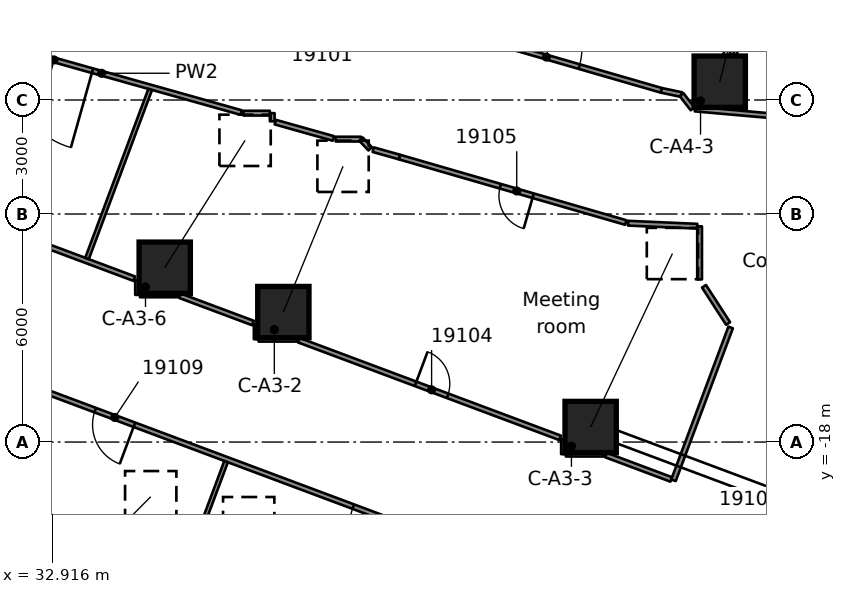
"""IFC4 building model, lengths in metres.
Left out: names, types, materials, properties, quantities, classifications, styles, units other than length and angle.
Written with IfcOpenShell. Run it as: python <this file> out.ifc"""

import sys

from ifc_helpers import new_model, si_unit, direction, frame, frame_2d, origin, origin_2d, place, context, subcontext, project, spatial, rectangle, extrude, element, fill, save


model = new_model("IFC4")
c1 = context("Model", 3, precision=1e-05, world=origin(), true_north=direction((0.0, 1.0)))
c2 = subcontext(c1, "Body", "Model", "MODEL_VIEW")
j1 = project(units=[si_unit("LENGTHUNIT", "METRE"), si_unit("PLANEANGLEUNIT", "RADIAN")], contexts=[c1])
p1 = place(None, origin())
s1 = spatial("IfcSite", under=j1, at=p1, CompositionType="ELEMENT")
p2 = place(p1, origin())
s2 = spatial("IfcBuilding", under=s1, at=p2, CompositionType="ELEMENT")
p3 = place(p2, frame((0.0, 0.0, 98.2)))
s3 = spatial("IfcBuildingStorey", under=s2, at=p3, CompositionType="ELEMENT", Elevation=98.2)
p4 = place(p3, frame((35.6, -23.666, 0.562), z_axis=(0.478128500861, 0.682101182208, 0.553291165568), x_axis=(-0.818860826557, 0.573992113822, 0.0)))
e1 = element("IfcColumn", 1, at=p4, inside=s3, PredefinedType="COLUMN", context=c2, shape_type="SweptSolid", body=[
    extrude(rectangle(XDim=1.35, YDim=1.35, at=origin_2d()), origin(), (0.0, 0.0, 1.0), 5.197),
])
p5 = place(p3, frame((32.478, -22.499, 0.561), z_axis=(0.584827103489, 0.59100203301, 0.555602246218), x_axis=(-0.710810388634, 0.703383672977, 0.0)))
e2 = element("IfcColumn", 2, at=p5, inside=s3, PredefinedType="COLUMN", context=c2, shape_type="SweptSolid", body=[
    extrude(rectangle(XDim=1.35, YDim=1.35, at=origin_2d()), origin(), (0.0, 0.0, 1.0), 5.179),
])
p6 = place(p3, frame((38.997, -14.58, 0.553), z_axis=(0.310782507683, 0.758869548286, 0.572303452377), x_axis=(-0.925403354822, 0.378983681555, 0.0)))
e3 = element("IfcColumn", 3, at=p6, inside=s3, PredefinedType="COLUMN", context=c2, shape_type="SweptSolid", body=[
    extrude(rectangle(XDim=1.35, YDim=1.35, at=origin_2d()), origin(), (0.0, 0.0, 1.0), 5.055),
])
p7 = place(p3, frame((47.083, -17.604, 0.589), z_axis=(0.372353666966, 0.789462395389, 0.487956835143), x_axis=(-0.904446734387, 0.42658657346, 0.0)))
e4 = element("IfcColumn", 4, at=p7, inside=s3, PredefinedType="COLUMN", context=c2, shape_type="SweptSolid", body=[
    extrude(rectangle(XDim=1.35, YDim=1.35, at=origin_2d()), origin(), (0.0, 0.0, 1.0), 5.782),
])
p8 = place(p3, frame((35.875, -13.413, 0.544), z_axis=(0.430023456329, 0.681544736858, 0.592095092589), x_axis=(-0.845727400457, 0.533615183551, 0.0)))
e5 = element("IfcColumn", 5, at=p8, inside=s3, PredefinedType="COLUMN", context=c2, shape_type="SweptSolid", body=[
    extrude(rectangle(XDim=1.35, YDim=1.35, at=origin_2d()), origin(), (0.0, 0.0, 1.0), 4.918),
])
p9 = place(p3, frame((50.48, -8.518, 0.588), z_axis=(0.215420955051, 0.844110563968, 0.4909899876), x_axis=(-0.968944293567, 0.247279105393, 0.0)))
e6 = element("IfcColumn", 6, at=p9, inside=s3, PredefinedType="COLUMN", context=c2, shape_type="SweptSolid", body=[
    extrude(rectangle(XDim=1.35, YDim=1.35, at=origin_2d()), origin(), (0.0, 0.0, 1.0), 5.752),
])
p10 = place(p3, frame((50.066, -13.901, 0.0), z_axis=(0.0, 0.0, 1.0), x_axis=(0.543589710843, -0.839351074501, 0.0)))
e7 = element("IfcWall", 7, at=p10, inside=s3, PredefinedType="PARTITIONING", context=c2, shape_type="SweptSolid", body=[
    extrude(rectangle(XDim=1.167, YDim=0.125, at=frame_2d((0.583, 0.0))), origin(), (0.0, 0.0, 1.0), 3.58),
])
p11 = place(p3, frame((45.614, -21.485, 0.0), z_axis=(0.0, 0.0, 1.0), x_axis=(-0.936670500211, 0.350211898761, 0.0)))
e8 = element("IfcWall", 8, at=p11, inside=s3, PredefinedType="PARTITIONING", context=c2, shape_type="SweptSolid", body=[
    extrude(rectangle(XDim=19.229, YDim=0.125, at=frame_2d((9.614, 0.0))), origin(), (0.0, 0.0, 1.0), 3.58),
])
p12 = place(p11, frame((15.8, 0.0, 0.0)))
e9 = element("IfcOpeningElement", 9, at=p12, cuts=e8, PredefinedType="OPENING", context=c2, shape_type="SweptSolid", body=[
    extrude(rectangle(XDim=1.8, YDim=2.1, at=frame_2d((0.9, 1.05))), frame((0.0, 0.073, 0.0), z_axis=(0.0, -1.0, 0.0), x_axis=(1.0, 0.0, 0.0)), (0.0, 0.0, 1.0), 0.145),
])
p13 = place(p11, frame((11.25, 0.0, 0.0)))
e10 = element("IfcOpeningElement", 10, at=p13, cuts=e8, PredefinedType="OPENING", context=c2, shape_type="SweptSolid", body=[
    extrude(rectangle(XDim=1.1, YDim=2.1, at=frame_2d((0.55, 1.05))), frame((0.0, 0.073, 0.0), z_axis=(0.0, -1.0, 0.0), x_axis=(1.0, 0.0, 0.0)), (0.0, 0.0, 1.0), 0.145),
])
p14 = place(p11, frame((3.3, 0.0, 0.0)))
e11 = element("IfcOpeningElement", 11, at=p14, cuts=e8, PredefinedType="OPENING", context=c2, shape_type="SweptSolid", body=[
    extrude(rectangle(XDim=1.8, YDim=2.1, at=frame_2d((0.9, 1.05))), frame((0.0, 0.073, 0.0), z_axis=(0.0, -1.0, 0.0), x_axis=(1.0, 0.0, 0.0)), (0.0, 0.0, 1.0), 0.145),
])
p15 = place(p3, frame((28.627, -11.29, 0.0), z_axis=(0.0, 0.0, 1.0), x_axis=(0.936621788465, -0.350342154718, 0.0)))
e12 = element("IfcWall", 12, at=p15, inside=s3, PredefinedType="PARTITIONING", context=c2, shape_type="SweptSolid", body=[
    extrude(rectangle(XDim=6.884, YDim=0.125, at=frame_2d((3.442, 0.0))), origin(), (0.0, 0.0, 1.0), 3.58),
])
p16 = place(p3, frame((36.276, -14.15, 0.0), z_axis=(0.0, 0.0, 1.0), x_axis=(0.936773399127, -0.349936563805, 0.0)))
e13 = element("IfcWall", 13, at=p16, inside=s3, PredefinedType="PARTITIONING", context=c2, shape_type="SweptSolid", body=[
    extrude(rectangle(XDim=2.052, YDim=0.125, at=frame_2d((1.026, 0.0))), origin(), (0.0, 0.0, 1.0), 3.58),
])
p17 = place(p3, frame((39.397, -15.317, 0.0), z_axis=(0.0, 0.0, 1.0), x_axis=(0.936687629124, -0.350166082662, 0.0)))
e14 = element("IfcWall", 14, at=p17, inside=s3, PredefinedType="PARTITIONING", context=c2, shape_type="SweptSolid", body=[
    extrude(rectangle(XDim=7.351, YDim=0.125, at=frame_2d((3.676, 0.0))), origin(), (0.0, 0.0, 1.0), 3.58),
])
p18 = place(p17, frame((3.288, 0.0, 0.0)))
e15 = element("IfcOpeningElement", 15, at=p18, cuts=e14, PredefinedType="OPENING", context=c2, shape_type="SweptSolid", body=[
    extrude(rectangle(XDim=0.9, YDim=2.1, at=frame_2d((0.45, 1.05))), frame((0.0, 0.073, 0.0), z_axis=(0.0, -1.0, 0.0), x_axis=(1.0, 0.0, 0.0)), (0.0, 0.0, 1.0), 0.145),
])
p19 = place(p3, frame((47.485, -18.341, 0.0), z_axis=(0.0, 0.0, 1.0), x_axis=(0.936651330255, -0.350263166107, 0.0)))
e16 = element("IfcWall", 16, at=p19, inside=s3, PredefinedType="PARTITIONING", context=c2, shape_type="SweptSolid", body=[
    extrude(rectangle(XDim=1.835, YDim=0.125, at=frame_2d((0.917, 0.0))), origin(), (0.0, 0.0, 1.0), 3.58),
])
p20 = place(p3, frame((48.008, -12.224, 0.0), z_axis=(0.0, 0.0, 1.0), x_axis=(-0.960600770435, 0.277931933825, 0.0)))
e17 = element("IfcWall", 17, at=p20, inside=s3, PredefinedType="PARTITIONING", context=c2, shape_type="SweptSolid", body=[
    extrude(rectangle(XDim=6.203, YDim=0.125, at=frame_2d((3.102, 0.0))), origin(), (0.0, 0.0, 1.0), 3.58),
])
p21 = place(p20, frame((2.538, 0.0, 0.0)))
e18 = element("IfcOpeningElement", 18, at=p21, cuts=e17, PredefinedType="OPENING", context=c2, shape_type="SweptSolid", body=[
    extrude(rectangle(XDim=0.9, YDim=2.1, at=frame_2d((0.45, 1.05))), frame((0.0, 0.073, 0.0), z_axis=(0.0, -1.0, 0.0), x_axis=(1.0, 0.0, 0.0)), (0.0, 0.0, 1.0), 0.145),
])
p22 = place(p3, frame((43.037, -7.038, 0.0), z_axis=(0.0, 0.0, 1.0), x_axis=(0.960661918232, -0.277720504932, 0.0)))
e19 = element("IfcWall", 19, at=p22, inside=s3, PredefinedType="PARTITIONING", context=c2, shape_type="SweptSolid", body=[
    extrude(rectangle(XDim=6.146, YDim=0.125, at=frame_2d((3.073, 0.0))), origin(), (0.0, 0.0, 1.0), 3.58),
])
p23 = place(p22, frame((2.1, 0.0, 0.0)))
e20 = element("IfcOpeningElement", 20, at=p23, cuts=e19, PredefinedType="OPENING", context=c2, shape_type="SweptSolid", body=[
    extrude(rectangle(XDim=1.8, YDim=2.1, at=frame_2d((0.9, 1.05))), frame((0.0, 0.073, 0.0), z_axis=(0.0, -1.0, 0.0), x_axis=(1.0, 0.0, 0.0)), (0.0, 0.0, 1.0), 0.145),
])
p24 = place(p3, frame((37.886, -9.33, 0.0), z_axis=(0.0, 0.0, 1.0), x_axis=(-0.96262020384, 0.270854837798, 0.0)))
e21 = element("IfcWall", 21, at=p24, inside=s3, PredefinedType="PARTITIONING", context=c2, shape_type="SweptSolid", body=[
    extrude(rectangle(XDim=7.635, YDim=0.125, at=frame_2d((3.818, 0.0))), origin(), (0.0, 0.0, 1.0), 3.58),
])
p25 = place(p24, frame((4.063, 0.0, 0.0)))
e22 = element("IfcOpeningElement", 22, at=p25, cuts=e21, PredefinedType="OPENING", context=c2, shape_type="SweptSolid", body=[
    extrude(rectangle(XDim=2.1, YDim=2.1, at=frame_2d((1.05, 1.05))), frame((0.0, 0.073, 0.0), z_axis=(0.0, -1.0, 0.0), x_axis=(1.0, 0.0, 0.0)), (0.0, 0.0, 1.0), 0.145),
])
p26 = place(p3, frame((38.784, -9.582, 0.0), z_axis=(0.0, 0.0, 1.0), x_axis=(0.962714723357, -0.270518689617, 0.0)))
e23 = element("IfcWall", 23, at=p26, inside=s3, PredefinedType="PARTITIONING", context=c2, shape_type="SweptSolid", body=[
    extrude(rectangle(XDim=1.589, YDim=0.125, at=frame_2d((0.795, 0.0))), origin(), (0.0, 0.0, 1.0), 3.58),
])
p27 = place(p3, frame((41.363, -10.307, 0.0), z_axis=(0.0, 0.0, 1.0), x_axis=(0.962589533882, -0.270963815409, 0.0)))
e24 = element("IfcWall", 24, at=p27, inside=s3, PredefinedType="PARTITIONING", context=c2, shape_type="SweptSolid", body=[
    extrude(rectangle(XDim=0.713, YDim=0.125, at=frame_2d((0.356, 0.0))), origin(), (0.0, 0.0, 1.0), 3.58),
])
p28 = place(p3, frame((48.068, -12.241, 0.0), z_axis=(0.0, 0.0, 1.0), x_axis=(0.999033262009, -0.043960680164, 0.0)))
e25 = element("IfcWall", 25, at=p28, inside=s3, PredefinedType="PARTITIONING", context=c2, shape_type="SweptSolid", body=[
    extrude(rectangle(XDim=1.822, YDim=0.125, at=frame_2d((0.911, 0.0))), origin(), (0.0, 0.0, 1.0), 3.58),
])
p29 = place(p3, frame((48.942, -8.745, 0.0), z_axis=(0.0, 0.0, 1.0), x_axis=(0.978349703119, -0.206958591044, 0.0)))
e26 = element("IfcWall", 26, at=p29, inside=s3, PredefinedType="PARTITIONING", context=c2, shape_type="SweptSolid", body=[
    extrude(rectangle(XDim=0.545, YDim=0.125, at=frame_2d((0.272, 0.0))), origin(), (0.0, 0.0, 1.0), 3.58),
])
p30 = place(p3, frame((52.135, -9.441, 0.0), z_axis=(0.0, 0.0, 1.0), x_axis=(-0.996118984803, 0.088016862678, 0.0)))
e27 = element("IfcWall", 27, at=p30, inside=s3, PredefinedType="PARTITIONING", context=c2, shape_type="SweptSolid", body=[
    extrude(rectangle(XDim=2.316, YDim=0.125, at=frame_2d((1.158, 0.0))), origin(), (0.0, 0.0, 1.0), 3.58),
])
p31 = place(p3, frame((46.431, -18.318, 0.0), z_axis=(0.0, 0.0, 1.0), x_axis=(1.0, 0.0, 0.0)))
e28 = element("IfcWall", 28, at=p31, inside=s3, PredefinedType="PARTITIONING", context=c2, shape_type="SweptSolid", body=[
    extrude(rectangle(XDim=0.995, YDim=0.125, at=frame_2d((0.498, 0.0))), origin(), (0.0, 0.0, 1.0), 3.58),
])
for number, where, z_axis, x_axis in (
    (29, (38.346, -15.294, 0.0), (0.0, 0.0, 1.0), (1.0, 0.0, 0.0)),
    (30, (35.224, -14.127, 0.0), (0.0, 0.0, 1.0), (1.0, 0.0, 0.0)),
):
    element("IfcWall", number, at=place(p3, frame(where, z_axis=z_axis, x_axis=x_axis)), inside=s3, PredefinedType="PARTITIONING", context=c2, shape_type="SweptSolid", body=[
        extrude(rectangle(XDim=0.991, YDim=0.125, at=frame_2d((0.496, 0.0))), origin(), (0.0, 0.0, 1.0), 3.58),
    ])
p32 = place(p3, frame((40.374, -10.029, 0.0), z_axis=(0.0, 0.0, 1.0), x_axis=(1.0, 0.0, 0.0)))
e31 = element("IfcWall", 31, at=p32, inside=s3, PredefinedType="PARTITIONING", context=c2, shape_type="SweptSolid", body=[
    extrude(rectangle(XDim=0.666, YDim=0.125, at=frame_2d((0.333, 0.0))), origin(), (0.0, 0.0, 1.0), 3.58),
])
p33 = place(p3, frame((37.946, -9.346, 0.0), z_axis=(0.0, 0.0, 1.0), x_axis=(1.0, 0.0, 0.0)))
e32 = element("IfcWall", 32, at=p33, inside=s3, PredefinedType="PARTITIONING", context=c2, shape_type="SweptSolid", body=[
    extrude(rectangle(XDim=0.696, YDim=0.125, at=frame_2d((0.348, 0.0))), origin(), (0.0, 0.0, 1.0), 3.58),
])
p34 = place(p3, frame((54.954, -14.065, 0.0), z_axis=(0.0, 0.0, 1.0), x_axis=(-0.350167821349, -0.936686979141, 0.0)))
e33 = element("IfcWall", 33, at=p34, inside=s3, PredefinedType="PARTITIONING", context=c2, shape_type="SweptSolid", body=[
    extrude(rectangle(XDim=10.221, YDim=0.125, at=frame_2d((5.111, 0.0))), origin(), (0.0, 0.0, 1.0), 3.58),
])
p35 = place(p34, frame((7.215, 0.0, 0.0)))
e34 = element("IfcOpeningElement", 34, at=p35, cuts=e33, PredefinedType="OPENING", context=c2, shape_type="SweptSolid", body=[
    extrude(rectangle(XDim=0.9, YDim=2.1, at=frame_2d((0.45, 1.05))), frame((0.0, 0.073, 0.0), z_axis=(0.0, -1.0, 0.0), x_axis=(1.0, 0.0, 0.0)), (0.0, 0.0, 1.0), 0.145),
])
p36 = place(p3, frame((49.263, -19.006, 0.0), z_axis=(0.0, 0.0, 1.0), x_axis=(0.350363010059, 0.936613987287, 0.0)))
e35 = element("IfcWall", 35, at=p36, inside=s3, PredefinedType="PARTITIONING", context=c2, shape_type="SweptSolid", body=[
    extrude(rectangle(XDim=4.293, YDim=0.125, at=frame_2d((2.146, 0.0))), origin(), (0.0, 0.0, 1.0), 3.58),
])
p37 = place(p3, frame((50.277, -9.158, 0.0), z_axis=(0.0, 0.0, 1.0), x_axis=(0.350194162307, 0.936677131506, 0.0)))
e36 = element("IfcWall", 36, at=p37, inside=s3, PredefinedType="PARTITIONING", context=c2, shape_type="SweptSolid", body=[
    extrude(rectangle(XDim=16.011, YDim=0.1, at=frame_2d((8.005, 0.0))), origin(), (0.0, 0.0, 1.0), 3.58),
])
p38 = place(p3, frame((31.874, -33.536, 0.0), z_axis=(0.0, 0.0, 1.0), x_axis=(0.350198982561, 0.93667532935, 0.0)))
e37 = element("IfcWall", 37, at=p38, inside=s3, PredefinedType="PARTITIONING", context=c2, shape_type="SweptSolid", body=[
    extrude(rectangle(XDim=16.037, YDim=0.1, at=frame_2d((8.018, 0.0))), origin(), (0.0, 0.0, 1.0), 3.58),
])
p39 = place(p3, frame((33.831, -13.169, 0.0), z_axis=(0.0, 0.0, 1.0), x_axis=(0.35005805829, 0.936728005253, 0.0)))
e38 = element("IfcWall", 38, at=p39, inside=s3, PredefinedType="PARTITIONING", context=c2, shape_type="SweptSolid", body=[
    extrude(rectangle(XDim=4.747, YDim=0.1, at=frame_2d((2.374, 0.0))), origin(), (0.0, 0.0, 1.0), 3.58),
])
p40 = place(p3, frame((49.95, -13.721, 0.0), z_axis=(0.0, 0.0, 1.0), x_axis=(0.0, 1.0, 0.0)))
e39 = element("IfcWall", 39, at=p40, inside=s3, PredefinedType="PARTITIONING", context=c2, shape_type="SweptSolid", body=[
    extrude(rectangle(XDim=1.397, YDim=0.125, at=frame_2d((0.698, 0.0))), origin(), (0.0, 0.0, 1.0), 3.58),
])
p41 = place(p3, frame((49.766, -9.232, 0.0), z_axis=(0.0, 0.0, 1.0), x_axis=(-0.614083266095, 0.789241244679, 0.0)))
e40 = element("IfcWall", 40, at=p41, inside=s3, PredefinedType="PARTITIONING", context=c2, shape_type="SweptSolid", body=[
    extrude(rectangle(XDim=0.474, YDim=0.125, at=frame_2d((0.237, 0.0))), origin(), (0.0, 0.0, 1.0), 3.58),
])
p42 = place(p3, frame((46.369, -18.318, 0.0), z_axis=(0.0, 0.0, 1.0), x_axis=(0.0, 1.0, 0.0)))
e41 = element("IfcWall", 41, at=p42, inside=s3, PredefinedType="PARTITIONING", context=c2, shape_type="SweptSolid", body=[
    extrude(rectangle(XDim=0.394, YDim=0.125, at=frame_2d((0.197, 0.0))), origin(), (0.0, 0.0, 1.0), 3.58),
])
p43 = place(p3, frame((41.282, -10.285, 0.0), z_axis=(0.0, 0.0, 1.0), x_axis=(-0.68707128389, 0.726590015658, 0.0)))
e42 = element("IfcWall", 42, at=p43, inside=s3, PredefinedType="PARTITIONING", context=c2, shape_type="SweptSolid", body=[
    extrude(rectangle(XDim=0.352, YDim=0.125, at=frame_2d((0.176, 0.0))), origin(), (0.0, 0.0, 1.0), 3.58),
])
p44 = place(p3, frame((38.704, -9.56, 0.0), z_axis=(0.0, 0.0, 1.0), x_axis=(0.0, 1.0, 0.0)))
e43 = element("IfcWall", 43, at=p44, inside=s3, PredefinedType="PARTITIONING", context=c2, shape_type="SweptSolid", body=[
    extrude(rectangle(XDim=0.214, YDim=0.125, at=frame_2d((0.107, 0.0))), origin(), (0.0, 0.0, 1.0), 3.58),
])
for number, where, z_axis, x_axis in (
    (44, (38.283, -15.294, 0.0), (0.0, 0.0, 1.0), (0.0, 1.0, 0.0)),
    (45, (35.161, -14.127, 0.0), (0.0, 0.0, 1.0), (0.0, 1.0, 0.0)),
):
    element("IfcWall", number, at=place(p3, frame(where, z_axis=z_axis, x_axis=x_axis)), inside=s3, PredefinedType="PARTITIONING", context=c2, shape_type="SweptSolid", body=[
        extrude(rectangle(XDim=0.394, YDim=0.125, at=frame_2d((0.197, 0.0))), origin(), (0.0, 0.0, 1.0), 3.58),
    ])
p45 = place(p23, origin())
e46 = element("IfcDoor", 46, at=p45, inside=s3, OperationType="DOUBLE_DOOR_SINGLE_SWING", PredefinedType="DOOR", context=c2, shape_type="SweptSolid", body=[
    extrude(rectangle(XDim=1.8, YDim=2.1, at=frame_2d((0.9, 1.05))), frame((0.0, 0.025, 0.0), z_axis=(0.0, -1.0, 0.0), x_axis=(1.0, 0.0, 0.0)), (0.0, 0.0, 1.0), 0.05),
])
fill(e20, e46)
p46 = place(p25, origin())
e47 = element("IfcDoor", 47, at=p46, inside=s3, OperationType="DOUBLE_DOOR_SINGLE_SWING", PredefinedType="DOOR", context=c2, shape_type="SweptSolid", body=[
    extrude(rectangle(XDim=2.1, YDim=2.1, at=frame_2d((1.05, 1.05))), frame((0.0, 0.025, 0.0), z_axis=(0.0, -1.0, 0.0), x_axis=(1.0, 0.0, 0.0)), (0.0, 0.0, 1.0), 0.05),
])
fill(e22, e47)
p47 = place(p18, origin())
e48 = element("IfcDoor", 48, at=p47, inside=s3, OperationType="SINGLE_SWING_RIGHT", PredefinedType="DOOR", context=c2, shape_type="SweptSolid", body=[
    extrude(rectangle(XDim=0.9, YDim=2.1, at=frame_2d((0.45, 1.05))), frame((0.0, 0.025, 0.0), z_axis=(0.0, -1.0, 0.0), x_axis=(1.0, 0.0, 0.0)), (0.0, 0.0, 1.0), 0.05),
])
fill(e15, e48)
p48 = place(p21, origin())
e49 = element("IfcDoor", 49, at=p48, inside=s3, OperationType="SINGLE_SWING_LEFT", PredefinedType="DOOR", context=c2, shape_type="SweptSolid", body=[
    extrude(rectangle(XDim=0.9, YDim=2.1, at=frame_2d((0.45, 1.05))), frame((0.0, 0.025, 0.0), z_axis=(0.0, -1.0, 0.0), x_axis=(1.0, 0.0, 0.0)), (0.0, 0.0, 1.0), 0.05),
])
fill(e18, e49)
p49 = place(p13, origin())
e50 = element("IfcDoor", 50, at=p49, inside=s3, OperationType="SINGLE_SWING_RIGHT", PredefinedType="DOOR", context=c2, shape_type="SweptSolid", body=[
    extrude(rectangle(XDim=1.1, YDim=2.1, at=frame_2d((0.55, 1.05))), frame((0.0, 0.025, 0.0), z_axis=(0.0, -1.0, 0.0), x_axis=(1.0, 0.0, 0.0)), (0.0, 0.0, 1.0), 0.05),
])
fill(e10, e50)
p50 = place(p14, origin())
e51 = element("IfcDoor", 51, at=p50, inside=s3, OperationType="DOUBLE_DOOR_SINGLE_SWING", PredefinedType="DOOR", context=c2, shape_type="SweptSolid", body=[
    extrude(rectangle(XDim=1.8, YDim=2.1, at=frame_2d((0.9, 1.05))), frame((0.0, 0.025, 0.0), z_axis=(0.0, -1.0, 0.0), x_axis=(1.0, 0.0, 0.0)), (0.0, 0.0, 1.0), 0.05),
])
fill(e11, e51)
save(model, sys.argv[1])
